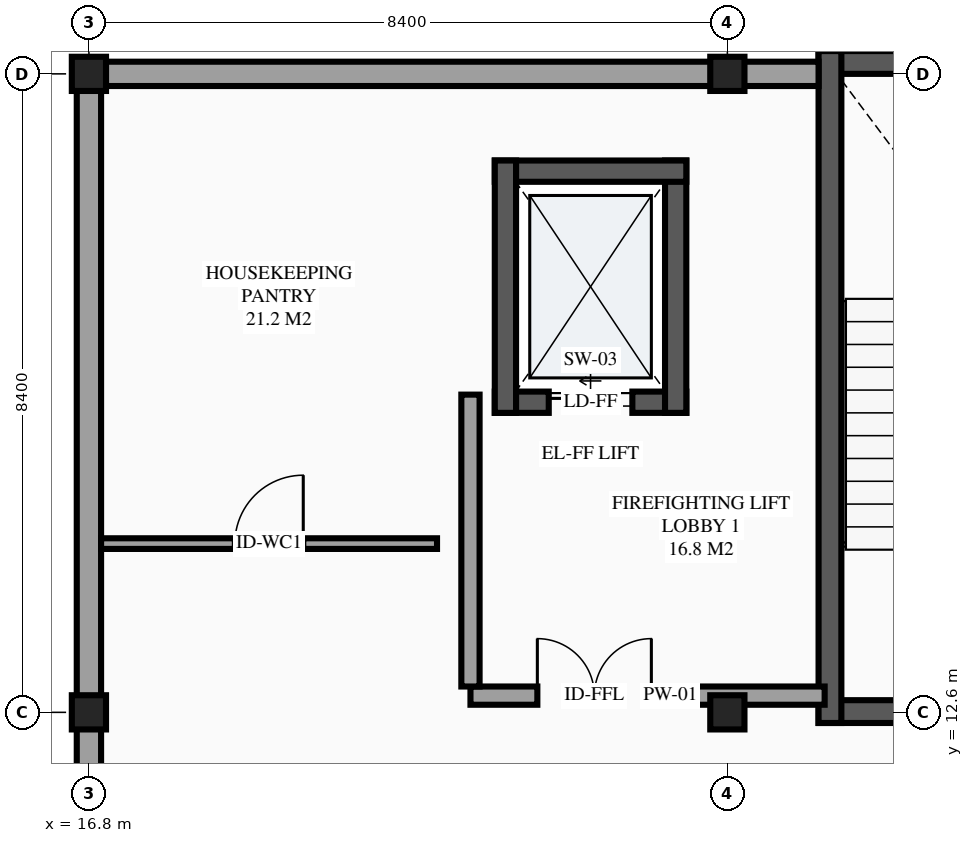
"""IFC4 building model, lengths in metres.
Left out: names, types, materials, properties, quantities, classifications, styles, units other than length and angle.
Written with IfcOpenShell. Run it as: python <this file> out.ifc"""

import sys

from ifc_helpers import new_model, si_unit, direction, frame, frame_2d, origin, origin_2d, place, context, subcontext, project, spatial, rectangle, extrude, element, fill, save


model = new_model("IFC4")
c1 = context("Model", 3, precision=1e-05, world=origin(), true_north=direction((0.0, 1.0)))
c2 = subcontext(c1, "Body", "Model", "MODEL_VIEW")
j1 = project(units=[si_unit("LENGTHUNIT", "METRE"), si_unit("PLANEANGLEUNIT", "RADIAN")], contexts=[c1])
p1 = place(None, origin())
s1 = spatial("IfcSite", under=j1, at=p1, CompositionType="ELEMENT")
p2 = place(p1, origin())
s2 = spatial("IfcBuilding", under=s1, at=p2, CompositionType="ELEMENT")
p3 = place(p2, frame((0.0, 0.0, 43.5)))
s3 = spatial("IfcBuildingStorey", under=s2, at=p3, CompositionType="ELEMENT", Elevation=43.5)
for number, where, z_axis, x_axis in (
    (1, (16.8, 12.6, 0.0), (0.0, 0.0, 1.0), (1.0, 0.0, 0.0)),
    (2, (16.8, 21.0, 0.0), (0.0, 0.0, 1.0), (1.0, 0.0, 0.0)),
    (3, (25.2, 12.6, 0.0), (0.0, 0.0, 1.0), (1.0, 0.0, 0.0)),
    (4, (25.2, 21.0, 0.0), (0.0, 0.0, 1.0), (1.0, 0.0, 0.0)),
):
    element("IfcColumn", number, at=place(p3, frame(where, z_axis=z_axis, x_axis=x_axis)), inside=s3, PredefinedType="COLUMN", context=c2, shape_type="SweptSolid", body=[
        extrude(rectangle(XDim=0.45, YDim=0.45, at=origin_2d()), origin(), (0.0, 0.0, 1.0), 3.6),
    ])
p4 = place(p3, frame((25.2, 21.0, 0.0), z_axis=(0.0, 0.0, 1.0), x_axis=(-1.0, 0.0, 0.0)))
e5 = element("IfcWall", 5, at=p4, inside=s3, PredefinedType="STANDARD", context=c2, shape_type="SweptSolid", body=[
    extrude(rectangle(XDim=8.4, YDim=0.32, at=frame_2d((4.2, 0.0))), origin(), (0.0, 0.0, 1.0), 2.46),
])
p5 = place(p3, frame((16.8, 21.0, 0.0), z_axis=(0.0, 0.0, 1.0), x_axis=(0.0, -1.0, 0.0)))
e6 = element("IfcWall", 6, at=p5, inside=s3, PredefinedType="STANDARD", context=c2, shape_type="SweptSolid", body=[
    extrude(rectangle(XDim=11.0, YDim=0.32, at=frame_2d((5.5, 0.0))), origin(), (0.0, 0.0, 1.0), 2.51),
])
p6 = place(p3, frame((22.14, 16.68, 0.0), z_axis=(0.0, 0.0, 1.0), x_axis=(1.0, 0.0, 0.0)))
e7 = element("IfcWall", 7, at=p6, inside=s3, PredefinedType="SHEAR", context=c2, shape_type="SweptSolid", body=[
    extrude(rectangle(XDim=2.52, YDim=0.28, at=frame_2d((1.26, 0.0))), origin(), (0.0, 0.0, 1.0), 3.6),
])
p7 = place(p6, frame((0.71, 0.0, 0.0)))
e8 = element("IfcOpeningElement", 8, at=p7, cuts=e7, PredefinedType="OPENING", context=c2, shape_type="SweptSolid", body=[
    extrude(rectangle(XDim=1.1, YDim=2.2, at=frame_2d((0.55, 1.1))), frame((0.0, 0.15, 0.0), z_axis=(0.0, -1.0, 0.0), x_axis=(1.0, 0.0, 0.0)), (0.0, 0.0, 1.0), 0.3),
])
p8 = place(p3, frame((24.52, 16.54, 0.0), z_axis=(0.0, 0.0, 1.0), x_axis=(0.0, 1.0, 0.0)))
e9 = element("IfcWall", 9, at=p8, inside=s3, PredefinedType="SHEAR", context=c2, shape_type="SweptSolid", body=[
    extrude(rectangle(XDim=3.32, YDim=0.28, at=frame_2d((1.66, 0.0))), origin(), (0.0, 0.0, 1.0), 3.6),
])
p9 = place(p3, frame((24.66, 19.72, 0.0), z_axis=(0.0, 0.0, 1.0), x_axis=(-1.0, 0.0, 0.0)))
e10 = element("IfcWall", 10, at=p9, inside=s3, PredefinedType="SHEAR", context=c2, shape_type="SweptSolid", body=[
    extrude(rectangle(XDim=2.52, YDim=0.28, at=frame_2d((1.26, 0.0))), origin(), (0.0, 0.0, 1.0), 3.6),
])
p10 = place(p3, frame((22.28, 19.86, 0.0), z_axis=(0.0, 0.0, 1.0), x_axis=(0.0, -1.0, 0.0)))
e11 = element("IfcWall", 11, at=p10, inside=s3, PredefinedType="SHEAR", context=c2, shape_type="SweptSolid", body=[
    extrude(rectangle(XDim=3.32, YDim=0.28, at=frame_2d((1.66, 0.0))), origin(), (0.0, 0.0, 1.0), 3.6),
])
p11 = place(p3, frame((26.4, 12.61, 0.0), z_axis=(0.0, 0.0, 1.0), x_axis=(1.0, 0.0, 0.0)))
e12 = element("IfcWall", 12, at=p11, inside=s3, PredefinedType="SHEAR", context=c2, shape_type="SweptSolid", body=[
    extrude(rectangle(XDim=5.2, YDim=0.3, at=frame_2d((2.6, 0.0))), origin(), (0.0, 0.0, 1.0), 3.6),
])
p12 = place(p11, frame((2.025, 0.0, 0.0)))
e13 = element("IfcOpeningElement", 13, at=p12, cuts=e12, PredefinedType="OPENING", context=c2, shape_type="SweptSolid", body=[
    extrude(rectangle(XDim=1.15, YDim=2.15, at=frame_2d((0.575, 1.075))), frame((0.0, 0.16, 0.0), z_axis=(0.0, -1.0, 0.0), x_axis=(1.0, 0.0, 0.0)), (0.0, 0.0, 1.0), 0.32),
])
p13 = place(p3, frame((31.6, 21.15, 0.0), z_axis=(0.0, 0.0, 1.0), x_axis=(-1.0, 0.0, 0.0)))
e14 = element("IfcWall", 14, at=p13, inside=s3, PredefinedType="SHEAR", context=c2, shape_type="SweptSolid", body=[
    extrude(rectangle(XDim=5.2, YDim=0.3, at=frame_2d((2.6, 0.0))), origin(), (0.0, 0.0, 1.0), 3.6),
])
p14 = place(p3, frame((26.55, 21.3, 0.0), z_axis=(0.0, 0.0, 1.0), x_axis=(0.0, -1.0, 0.0)))
e15 = element("IfcWall", 15, at=p14, inside=s3, PredefinedType="SHEAR", context=c2, shape_type="SweptSolid", body=[
    extrude(rectangle(XDim=8.84, YDim=0.3, at=frame_2d((4.42, 0.0))), origin(), (0.0, 0.0, 1.0), 3.6),
])
p15 = place(p3, frame((21.82, 12.82, 0.0), z_axis=(0.0, 0.0, 1.0), x_axis=(1.0, 0.0, 0.0)))
e16 = element("IfcWall", 16, at=p15, inside=s3, PredefinedType="PARTITIONING", context=c2, shape_type="SweptSolid", body=[
    extrude(rectangle(XDim=4.66, YDim=0.24, at=frame_2d((2.33, 0.0))), origin(), (0.0, 0.0, 1.0), 2.46),
])
p16 = place(p15, frame((0.88, 0.0, 0.0)))
e17 = element("IfcOpeningElement", 17, at=p16, cuts=e16, PredefinedType="OPENING", context=c2, shape_type="SweptSolid", body=[
    extrude(rectangle(XDim=1.5, YDim=2.15, at=frame_2d((0.75, 1.075))), frame((0.0, 0.13, 0.0), z_axis=(0.0, -1.0, 0.0), x_axis=(1.0, 0.0, 0.0)), (0.0, 0.0, 1.0), 0.26),
])
p17 = place(p3, frame((21.82, 12.94, 0.0), z_axis=(0.0, 0.0, 1.0), x_axis=(0.0, 1.0, 0.0)))
e18 = element("IfcWall", 18, at=p17, inside=s3, PredefinedType="PARTITIONING", context=c2, shape_type="SweptSolid", body=[
    extrude(rectangle(XDim=3.84, YDim=0.24, at=frame_2d((1.92, 0.0))), origin(), (0.0, 0.0, 1.0), 3.355),
])
p18 = place(p3, frame((16.96, 14.82, 0.0), z_axis=(0.0, 0.0, 1.0), x_axis=(1.0, 0.0, 0.0)))
e19 = element("IfcWall", 19, at=p18, inside=s3, PredefinedType="PARTITIONING", context=c2, shape_type="SweptSolid", body=[
    extrude(rectangle(XDim=4.42, YDim=0.14, at=frame_2d((2.21, 0.0))), origin(), (0.0, 0.0, 1.0), 3.355),
])
p19 = place(p18, frame((1.76, 0.0, 0.0)))
e20 = element("IfcOpeningElement", 20, at=p19, cuts=e19, PredefinedType="OPENING", context=c2, shape_type="SweptSolid", body=[
    extrude(rectangle(XDim=0.9, YDim=2.12, at=frame_2d((0.45, 1.06))), frame((0.0, 0.08, 0.0), z_axis=(0.0, -1.0, 0.0), x_axis=(1.0, 0.0, 0.0)), (0.0, 0.0, 1.0), 0.16),
])
p20 = place(p3, frame((26.4, 21.0, 0.0), z_axis=(0.0, 0.0, 1.0), x_axis=(-1.0, 0.0, 0.0)))
e21 = element("IfcWall", 21, at=p20, inside=s3, PredefinedType="STANDARD", context=c2, shape_type="SweptSolid", body=[
    extrude(rectangle(XDim=1.2, YDim=0.32, at=frame_2d((0.6, 0.0))), origin(), (0.0, 0.0, 1.0), 3.055),
])
p21 = place(p7, origin())
e22 = element("IfcDoor", 22, at=p21, inside=s3, OperationType="SLIDING_TO_LEFT", PredefinedType="DOOR", context=c2, shape_type="SweptSolid", body=[
    extrude(rectangle(XDim=1.1, YDim=2.2, at=frame_2d((0.55, 1.1))), frame((0.0, 0.025, 0.0), z_axis=(0.0, -1.0, 0.0), x_axis=(1.0, 0.0, 0.0)), (0.0, 0.0, 1.0), 0.05),
])
fill(e8, e22)
p22 = place(p16, origin())
e23 = element("IfcDoor", 23, at=p22, inside=s3, OperationType="DOUBLE_DOOR_SINGLE_SWING", PredefinedType="DOOR", context=c2, shape_type="SweptSolid", body=[
    extrude(rectangle(XDim=1.5, YDim=2.15, at=frame_2d((0.75, 1.075))), frame((0.0, 0.025, 0.0), z_axis=(0.0, -1.0, 0.0), x_axis=(1.0, 0.0, 0.0)), (0.0, 0.0, 1.0), 0.05),
])
fill(e17, e23)
p23 = place(p19, origin())
e24 = element("IfcDoor", 24, at=p23, inside=s3, OperationType="SINGLE_SWING_RIGHT", PredefinedType="DOOR", context=c2, shape_type="SweptSolid", body=[
    extrude(rectangle(XDim=0.9, YDim=2.12, at=frame_2d((0.45, 1.06))), frame((0.0, 0.025, 0.0), z_axis=(0.0, -1.0, 0.0), x_axis=(1.0, 0.0, 0.0)), (0.0, 0.0, 1.0), 0.05),
])
fill(e20, e24)
save(model, sys.argv[1])
